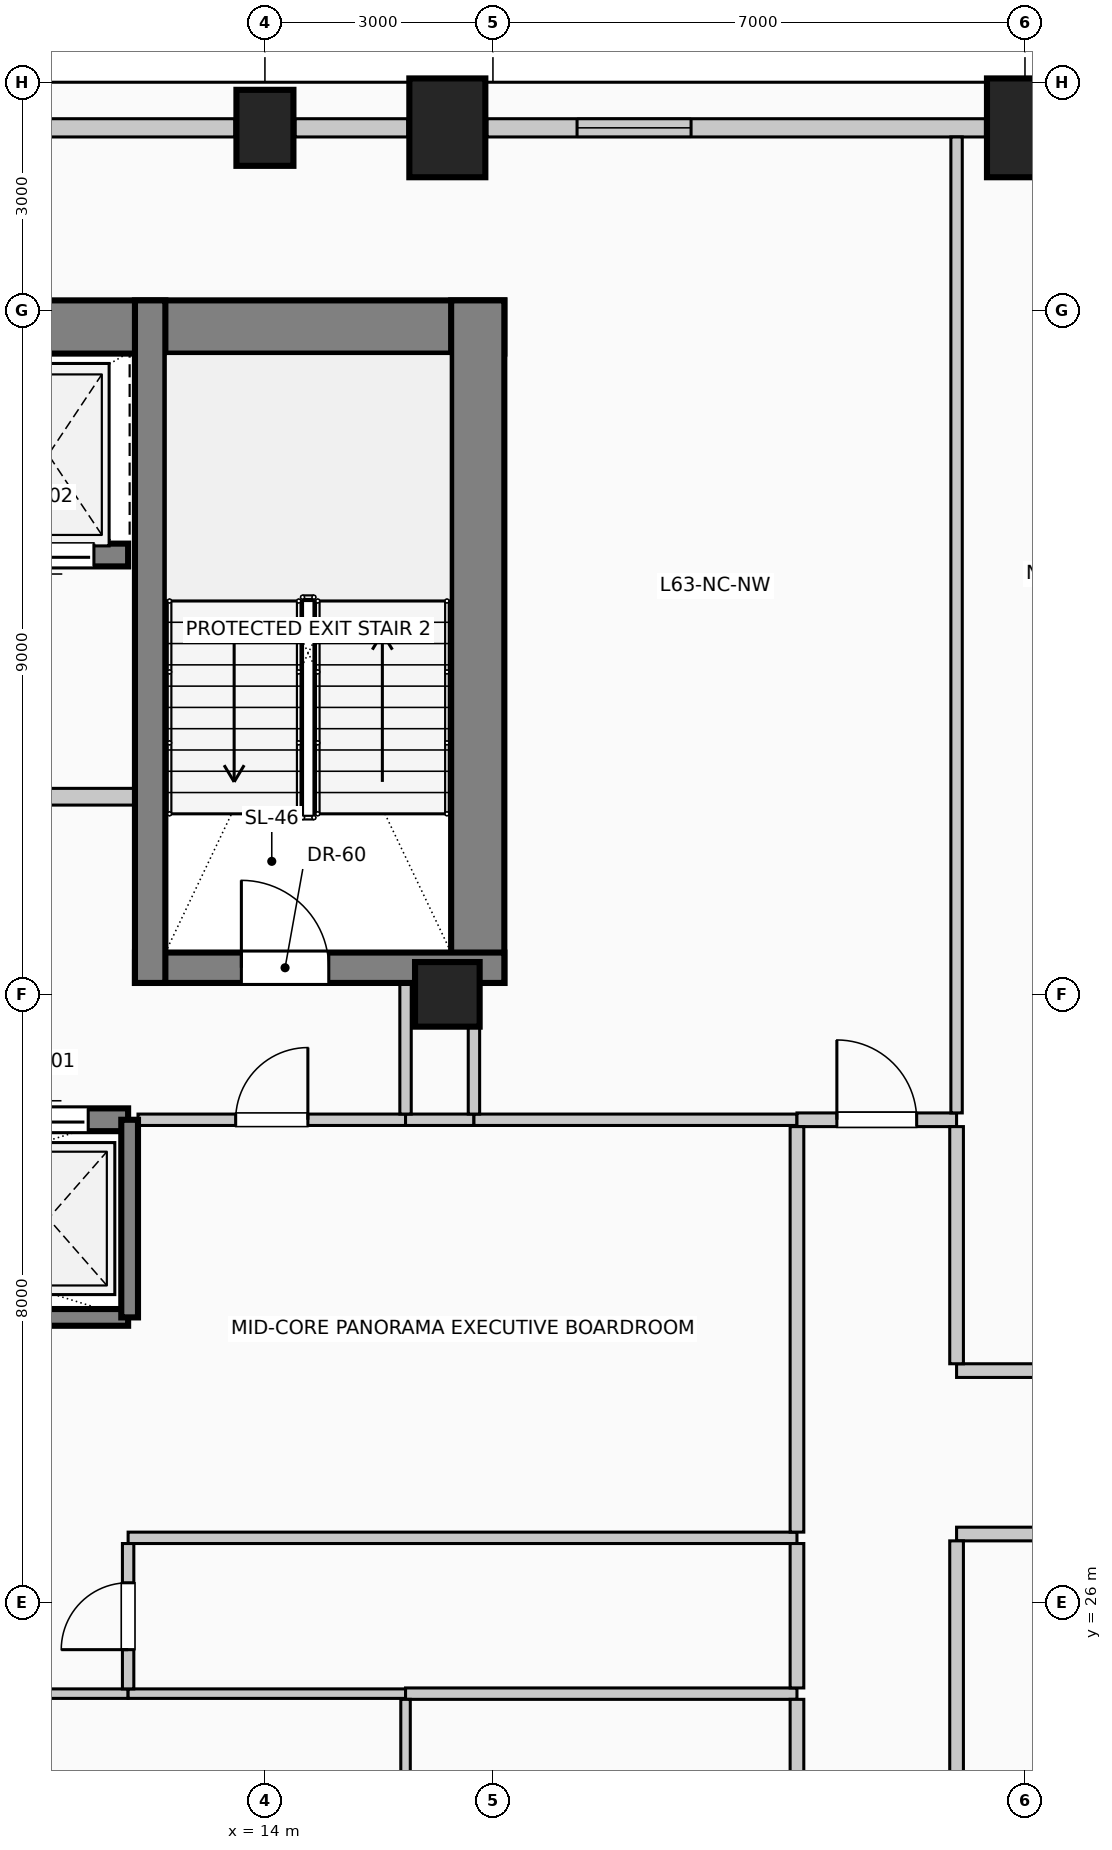
"""IFC4 building model, lengths in metres.
Left out: names, types, materials, properties, quantities, classifications, styles, units other than length and angle.
Written with IfcOpenShell. Run it as: python <this file> out.ifc"""

import sys

from ifc_helpers import new_model, si_unit, direction, frame, frame_2d, origin, origin_2d, place, context, subcontext, project, spatial, rectangle, circle, extrude, element, fill, save


model = new_model("IFC4")
c1 = context("Model", 3, precision=1e-05, world=origin(), true_north=direction((0.0, 1.0)))
c2 = subcontext(c1, "Body", "Model", "MODEL_VIEW")
j1 = project(units=[si_unit("LENGTHUNIT", "METRE"), si_unit("PLANEANGLEUNIT", "RADIAN")], contexts=[c1])
p1 = place(None, origin())
s1 = spatial("IfcSite", under=j1, at=p1, CompositionType="ELEMENT")
p2 = place(p1, origin())
s2 = spatial("IfcBuilding", under=s1, at=p2, CompositionType="ELEMENT")
p3 = place(p2, frame((0.0, 0.0, 260.6)))
s3 = spatial("IfcBuildingStorey", under=s2, at=p3, CompositionType="ELEMENT", Elevation=260.6)
p4 = place(p3, frame((2.85, 42.78, 0.0), z_axis=(0.0, 0.0, 1.0), x_axis=(1.0, 0.0, 0.0)))
e1 = element("IfcWall", 1, at=p4, inside=s3, PredefinedType="SHEAR", context=c2, shape_type="SweptSolid", body=[
    extrude(rectangle(XDim=14.3, YDim=0.7, at=frame_2d((7.15, 0.0))), origin(), (0.0, 0.0, 1.0), 4.0),
])
p5 = place(p3, frame((16.8, 34.15, 0.0), z_axis=(0.0, 0.0, 1.0), x_axis=(0.0, 1.0, 0.0)))
e2 = element("IfcWall", 2, at=p5, inside=s3, PredefinedType="SHEAR", context=c2, shape_type="SweptSolid", body=[
    extrude(rectangle(XDim=8.98, YDim=0.7, at=frame_2d((4.49, 0.0))), origin(), (0.0, 0.0, 1.0), 4.0),
])
p6 = place(p3, frame((12.29, 34.35, 0.0), z_axis=(0.0, 0.0, 1.0), x_axis=(1.0, 0.0, 0.0)))
e3 = element("IfcWall", 3, at=p6, inside=s3, PredefinedType="SHEAR", context=c2, shape_type="SweptSolid", body=[
    extrude(rectangle(XDim=4.86, YDim=0.4, at=frame_2d((2.43, 0.0))), origin(), (0.0, 0.0, 1.0), 4.0),
])
p7 = place(p6, frame((1.4, 0.0, 0.0)))
e4 = element("IfcOpeningElement", 4, at=p7, cuts=e3, PredefinedType="OPENING", context=c2, shape_type="SweptSolid", body=[
    extrude(rectangle(XDim=1.15, YDim=2.2, at=frame_2d((0.575, 1.1))), frame((0.0, 0.21, 0.0), z_axis=(0.0, -1.0, 0.0), x_axis=(1.0, 0.0, 0.0)), (0.0, 0.0, 1.0), 0.42),
])
p8 = place(p3, frame((12.49, 34.15, 0.0), z_axis=(0.0, 0.0, 1.0), x_axis=(0.0, 1.0, 0.0)))
e5 = element("IfcWall", 5, at=p8, inside=s3, PredefinedType="SHEAR", context=c2, shape_type="SweptSolid", body=[
    extrude(rectangle(XDim=8.98, YDim=0.4, at=frame_2d((4.49, 0.0))), origin(), (0.0, 0.0, 1.0), 4.0),
])
p9 = place(p3, frame((14.0, 45.4, 0.0), z_axis=(0.0, 0.0, 1.0), x_axis=(1.0, 0.0, 0.0)))
e6 = element("IfcColumn", 6, at=p9, inside=s3, PredefinedType="COLUMN", context=c2, shape_type="SweptSolid", body=[
    extrude(rectangle(XDim=0.75, YDim=1.0, at=origin_2d()), origin(), (0.0, 0.0, 1.0), 4.0),
])
for number, where, z_axis, x_axis in (
    (7, (16.4, 45.4, 0.0), (0.0, 0.0, 1.0), (1.0, 0.0, 0.0)),
    (8, (24.0, 45.4, 0.0), (0.0, 0.0, 1.0), (1.0, 0.0, 0.0)),
):
    element("IfcColumn", number, at=place(p3, frame(where, z_axis=z_axis, x_axis=x_axis)), inside=s3, PredefinedType="COLUMN", context=c2, shape_type="SweptSolid", body=[
        extrude(rectangle(XDim=1.0, YDim=1.3, at=origin_2d()), origin(), (0.0, 0.0, 1.0), 4.0),
    ])
p10 = place(p3, frame((16.4, 34.0, 0.0), z_axis=(0.0, 0.0, 1.0), x_axis=(1.0, 0.0, 0.0)))
e9 = element("IfcColumn", 9, at=p10, inside=s3, PredefinedType="COLUMN", context=c2, shape_type="SweptSolid", body=[
    extrude(circle(Radius=0.425, at=origin_2d()), origin(), (0.0, 0.0, 1.0), 4.0),
])
p11 = place(p3, frame((8.895, 45.4, 0.0), z_axis=(0.0, 0.0, 1.0), x_axis=(1.0, 0.0, 0.0)))
e10 = element("IfcWall", 10, at=p11, inside=s3, PredefinedType="SOLIDWALL", context=c2, shape_type="SweptSolid", body=[
    extrude(rectangle(XDim=4.71, YDim=0.24, at=frame_2d((2.355, 0.0))), origin(), (0.0, 0.0, 1.0), 3.0),
])
p12 = place(p3, frame((14.395, 45.4, 0.0), z_axis=(0.0, 0.0, 1.0), x_axis=(1.0, 0.0, 0.0)))
e11 = element("IfcWall", 11, at=p12, inside=s3, PredefinedType="SOLIDWALL", context=c2, shape_type="SweptSolid", body=[
    extrude(rectangle(XDim=1.485, YDim=0.24, at=frame_2d((0.742, 0.0))), origin(), (0.0, 0.0, 1.0), 3.0),
])
p13 = place(p3, frame((16.92, 45.4, 0.0), z_axis=(0.0, 0.0, 1.0), x_axis=(1.0, 0.0, 0.0)))
e12 = element("IfcWall", 12, at=p13, inside=s3, PredefinedType="SOLIDWALL", context=c2, shape_type="SweptSolid", body=[
    extrude(rectangle(XDim=6.56, YDim=0.24, at=frame_2d((3.28, 0.0))), origin(), (0.0, 0.0, 1.0), 3.0),
])
p14 = place(p13, frame((1.187, 0.0, 0.42)))
e13 = element("IfcOpeningElement", 13, at=p14, cuts=e12, PredefinedType="OPENING", context=c2, shape_type="SweptSolid", body=[
    extrude(rectangle(XDim=1.5, YDim=2.2, at=frame_2d((0.75, 1.1))), frame((0.0, 0.13, 0.0), z_axis=(0.0, -1.0, 0.0), x_axis=(1.0, 0.0, 0.0)), (0.0, 0.0, 1.0), 0.26),
])
p15 = place(p3, frame((10.05, 32.35, 0.0), z_axis=(0.0, 0.0, 1.0), x_axis=(1.0, 0.0, 0.0)))
e14 = element("IfcWall", 14, at=p15, inside=s3, PredefinedType="SOLIDWALL", context=c2, shape_type="SweptSolid", body=[
    extrude(rectangle(XDim=2.15, YDim=0.3, at=frame_2d((1.075, 0.0))), origin(), (0.0, 0.0, 1.0), 4.0),
])
p16 = place(p15, frame((0.525, 0.0, 0.0)))
e15 = element("IfcOpeningElement", 15, at=p16, cuts=e14, PredefinedType="OPENING", context=c2, shape_type="SweptSolid", body=[
    extrude(rectangle(XDim=1.1, YDim=2.2, at=frame_2d((0.55, 1.1))), frame((0.0, 0.16, 0.0), z_axis=(0.0, -1.0, 0.0), x_axis=(1.0, 0.0, 0.0)), (0.0, 0.0, 1.0), 0.32),
])
p17 = place(p3, frame((12.2, 39.78, 0.0), z_axis=(0.0, 0.0, 1.0), x_axis=(-1.0, 0.0, 0.0)))
e16 = element("IfcWall", 16, at=p17, inside=s3, PredefinedType="SOLIDWALL", context=c2, shape_type="SweptSolid", body=[
    extrude(rectangle(XDim=2.2, YDim=0.3, at=frame_2d((1.1, 0.0))), origin(), (0.0, 0.0, 1.0), 4.0),
])
p18 = place(p17, frame((0.45, 0.0, 0.0)))
e17 = element("IfcOpeningElement", 17, at=p18, cuts=e16, PredefinedType="OPENING", context=c2, shape_type="SweptSolid", body=[
    extrude(rectangle(XDim=1.3, YDim=2.25, at=frame_2d((0.65, 1.125))), frame((0.0, 0.16, 0.0), z_axis=(0.0, -1.0, 0.0), x_axis=(1.0, 0.0, 0.0)), (0.0, 0.0, 1.0), 0.32),
])
p19 = place(p3, frame((3.55, 29.75, 0.0), z_axis=(0.0, 0.0, 1.0), x_axis=(1.0, 0.0, 0.0)))
e18 = element("IfcWall", 18, at=p19, inside=s3, PredefinedType="SOLIDWALL", context=c2, shape_type="SweptSolid", body=[
    extrude(rectangle(XDim=8.65, YDim=0.22, at=frame_2d((4.325, 0.0))), origin(), (0.0, 0.0, 1.0), 4.0),
])
p20 = place(p3, frame((12.22, 29.75, 0.0), z_axis=(0.0, 0.0, 1.0), x_axis=(0.0, 1.0, 0.0)))
e19 = element("IfcWall", 19, at=p20, inside=s3, PredefinedType="SOLIDWALL", context=c2, shape_type="SweptSolid", body=[
    extrude(rectangle(XDim=2.6, YDim=0.22, at=frame_2d((1.3, 0.0))), origin(), (0.0, 0.0, 1.0), 4.0),
])
p21 = place(p3, frame((7.51, 36.6, 0.0), z_axis=(0.0, 0.0, 1.0), x_axis=(1.0, 0.0, 0.0)))
e20 = element("IfcWall", 20, at=p21, inside=s3, PredefinedType="PARTITIONING", context=c2, shape_type="SweptSolid", body=[
    extrude(rectangle(XDim=4.98, YDim=0.22, at=frame_2d((2.49, 0.0))), origin(), (0.0, 0.0, 1.0), 3.75),
])
p22 = place(p21, frame((1.94, 0.0, 0.0)))
e21 = element("IfcOpeningElement", 21, at=p22, cuts=e20, PredefinedType="OPENING", context=c2, shape_type="SweptSolid", body=[
    extrude(rectangle(XDim=1.1, YDim=2.2, at=frame_2d((0.55, 1.1))), frame((0.0, 0.12, 0.0), z_axis=(0.0, -1.0, 0.0), x_axis=(1.0, 0.0, 0.0)), (0.0, 0.0, 1.0), 0.24),
])
p23 = place(p3, frame((9.8, 24.8, 0.0), z_axis=(0.0, 0.0, 1.0), x_axis=(1.0, 0.0, 0.0)))
e22 = element("IfcWall", 22, at=p23, inside=s3, PredefinedType="PARTITIONING", context=c2, shape_type="SweptSolid", body=[
    extrude(rectangle(XDim=2.4, YDim=0.125, at=frame_2d((1.2, 0.0))), origin(), (0.0, 0.0, 1.0), 3.75),
])
p24 = place(p3, frame((12.2, 24.8, 0.0), z_axis=(0.0, 0.0, 1.0), x_axis=(1.0, 0.0, 0.0)))
e23 = element("IfcWall", 23, at=p24, inside=s3, PredefinedType="PARTITIONING", context=c2, shape_type="SweptSolid", body=[
    extrude(rectangle(XDim=3.65, YDim=0.125, at=frame_2d((1.825, 0.0))), origin(), (0.0, 0.0, 1.0), 3.75),
])
p25 = place(p3, frame((15.85, 24.8, 0.0), z_axis=(0.0, 0.0, 1.0), x_axis=(1.0, 0.0, 0.0)))
e24 = element("IfcWall", 24, at=p25, inside=s3, PredefinedType="PARTITIONING", context=c2, shape_type="SweptSolid", body=[
    extrude(rectangle(XDim=5.15, YDim=0.15, at=frame_2d((2.575, 0.0))), origin(), (0.0, 0.0, 1.0), 3.75),
])
p26 = place(p3, frame((12.2, 26.85, 0.0), z_axis=(0.0, 0.0, 1.0), x_axis=(1.0, 0.0, 0.0)))
e25 = element("IfcWall", 25, at=p26, inside=s3, PredefinedType="PARTITIONING", context=c2, shape_type="SweptSolid", body=[
    extrude(rectangle(XDim=8.8, YDim=0.15, at=frame_2d((4.4, 0.0))), origin(), (0.0, 0.0, 1.0), 3.75),
])
p27 = place(p3, frame((23.1, 26.9, 0.0), z_axis=(0.0, 0.0, 1.0), x_axis=(1.0, 0.0, 0.0)))
e26 = element("IfcWall", 26, at=p27, inside=s3, PredefinedType="PARTITIONING", context=c2, shape_type="SweptSolid", body=[
    extrude(rectangle(XDim=4.12, YDim=0.18, at=frame_2d((2.06, 0.0))), origin(), (0.0, 0.0, 1.0), 3.75),
])
p28 = place(p27, frame((1.535, 0.0, 0.0)))
e27 = element("IfcOpeningElement", 27, at=p28, cuts=e26, PredefinedType="OPENING", context=c2, shape_type="SweptSolid", body=[
    extrude(rectangle(XDim=1.05, YDim=2.15, at=frame_2d((0.525, 1.075))), frame((0.0, 0.1, 0.0), z_axis=(0.0, -1.0, 0.0), x_axis=(1.0, 0.0, 0.0)), (0.0, 0.0, 1.0), 0.2),
])
p29 = place(p3, frame((23.1, 29.05, 0.0), z_axis=(0.0, 0.0, 1.0), x_axis=(1.0, 0.0, 0.0)))
e28 = element("IfcWall", 28, at=p29, inside=s3, PredefinedType="PARTITIONING", context=c2, shape_type="SweptSolid", body=[
    extrude(rectangle(XDim=7.13, YDim=0.18, at=frame_2d((3.565, 0.0))), origin(), (0.0, 0.0, 1.0), 3.75),
])
p30 = place(p29, frame((3.09, 0.0, 0.0)))
e29 = element("IfcOpeningElement", 29, at=p30, cuts=e28, PredefinedType="OPENING", context=c2, shape_type="SweptSolid", body=[
    extrude(rectangle(XDim=0.95, YDim=2.15, at=frame_2d((0.475, 1.075))), frame((0.0, 0.1, 0.0), z_axis=(0.0, -1.0, 0.0), x_axis=(1.0, 0.0, 0.0)), (0.0, 0.0, 1.0), 0.2),
])
p31 = place(p3, frame((12.33, 32.35, 0.0), z_axis=(0.0, 0.0, 1.0), x_axis=(1.0, 0.0, 0.0)))
e30 = element("IfcWall", 30, at=p31, inside=s3, PredefinedType="PARTITIONING", context=c2, shape_type="SweptSolid", body=[
    extrude(rectangle(XDim=3.52, YDim=0.15, at=frame_2d((1.76, 0.0))), origin(), (0.0, 0.0, 1.0), 3.75),
])
p32 = place(p31, frame((1.285, 0.0, 0.0)))
e31 = element("IfcOpeningElement", 31, at=p32, cuts=e30, PredefinedType="OPENING", context=c2, shape_type="SweptSolid", body=[
    extrude(rectangle(XDim=0.95, YDim=2.15, at=frame_2d((0.475, 1.075))), frame((0.0, 0.085, 0.0), z_axis=(0.0, -1.0, 0.0), x_axis=(1.0, 0.0, 0.0)), (0.0, 0.0, 1.0), 0.17),
])
p33 = place(p3, frame((15.85, 32.35, 0.0), z_axis=(0.0, 0.0, 1.0), x_axis=(1.0, 0.0, 0.0)))
e32 = element("IfcWall", 32, at=p33, inside=s3, PredefinedType="PARTITIONING", context=c2, shape_type="SweptSolid", body=[
    extrude(rectangle(XDim=0.9, YDim=0.15, at=frame_2d((0.45, 0.0))), origin(), (0.0, 0.0, 1.0), 3.75),
])
p34 = place(p3, frame((16.75, 32.35, 0.0), z_axis=(0.0, 0.0, 1.0), x_axis=(1.0, 0.0, 0.0)))
e33 = element("IfcWall", 33, at=p34, inside=s3, PredefinedType="PARTITIONING", context=c2, shape_type="SweptSolid", body=[
    extrude(rectangle(XDim=4.25, YDim=0.15, at=frame_2d((2.125, 0.0))), origin(), (0.0, 0.0, 1.0), 3.75),
])
p35 = place(p3, frame((21.0, 32.35, 0.0), z_axis=(0.0, 0.0, 1.0), x_axis=(1.0, 0.0, 0.0)))
e34 = element("IfcWall", 34, at=p35, inside=s3, PredefinedType="PARTITIONING", context=c2, shape_type="SweptSolid", body=[
    extrude(rectangle(XDim=2.1, YDim=0.18, at=frame_2d((1.05, 0.0))), origin(), (0.0, 0.0, 1.0), 3.75),
])
p36 = place(p35, frame((0.525, 0.0, 0.0)))
e35 = element("IfcOpeningElement", 35, at=p36, cuts=e34, PredefinedType="OPENING", context=c2, shape_type="SweptSolid", body=[
    extrude(rectangle(XDim=1.05, YDim=2.15, at=frame_2d((0.525, 1.075))), frame((0.0, 0.1, 0.0), z_axis=(0.0, -1.0, 0.0), x_axis=(1.0, 0.0, 0.0)), (0.0, 0.0, 1.0), 0.2),
])
p37 = place(p3, frame((12.2, 24.863, 0.0), z_axis=(0.0, 0.0, 1.0), x_axis=(0.0, 1.0, 0.0)))
e36 = element("IfcWall", 36, at=p37, inside=s3, PredefinedType="PARTITIONING", context=c2, shape_type="SweptSolid", body=[
    extrude(rectangle(XDim=1.912, YDim=0.15, at=frame_2d((0.956, 0.0))), origin(), (0.0, 0.0, 1.0), 3.75),
])
p38 = place(p37, frame((0.516, 0.0, 0.0)))
e37 = element("IfcOpeningElement", 37, at=p38, cuts=e36, PredefinedType="OPENING", context=c2, shape_type="SweptSolid", body=[
    extrude(rectangle(XDim=0.88, YDim=2.1, at=frame_2d((0.44, 1.05))), frame((0.0, 0.085, 0.0), z_axis=(0.0, -1.0, 0.0), x_axis=(1.0, 0.0, 0.0)), (0.0, 0.0, 1.0), 0.17),
])
p39 = place(p3, frame((15.85, 17.39, 0.0), z_axis=(0.0, 0.0, 1.0), x_axis=(0.0, 1.0, 0.0)))
e38 = element("IfcWall", 38, at=p39, inside=s3, PredefinedType="PARTITIONING", context=c2, shape_type="SweptSolid", body=[
    extrude(rectangle(XDim=7.335, YDim=0.125, at=frame_2d((3.667, 0.0))), origin(), (0.0, 0.0, 1.0), 3.75),
])
p40 = place(p3, frame((15.85, 32.425, 0.0), z_axis=(0.0, 0.0, 1.0), x_axis=(0.0, 1.0, 0.0)))
e39 = element("IfcWall", 39, at=p40, inside=s3, PredefinedType="PARTITIONING", context=c2, shape_type="SweptSolid", body=[
    extrude(rectangle(XDim=1.725, YDim=0.15, at=frame_2d((0.862, 0.0))), origin(), (0.0, 0.0, 1.0), 3.75),
])
p41 = place(p3, frame((16.75, 32.425, 0.0), z_axis=(0.0, 0.0, 1.0), x_axis=(0.0, 1.0, 0.0)))
e40 = element("IfcWall", 40, at=p41, inside=s3, PredefinedType="PARTITIONING", context=c2, shape_type="SweptSolid", body=[
    extrude(rectangle(XDim=1.15, YDim=0.15, at=frame_2d((0.575, 0.0))), origin(), (0.0, 0.0, 1.0), 3.75),
])
p42 = place(p3, frame((21.0, 17.39, 0.0), z_axis=(0.0, 0.0, 1.0), x_axis=(0.0, 1.0, 0.0)))
e41 = element("IfcWall", 41, at=p42, inside=s3, PredefinedType="PARTITIONING", context=c2, shape_type="SweptSolid", body=[
    extrude(rectangle(XDim=7.335, YDim=0.18, at=frame_2d((3.667, 0.0))), origin(), (0.0, 0.0, 1.0), 3.75),
])
p43 = place(p3, frame((21.0, 24.875, 0.0), z_axis=(0.0, 0.0, 1.0), x_axis=(0.0, 1.0, 0.0)))
e42 = element("IfcWall", 42, at=p43, inside=s3, PredefinedType="PARTITIONING", context=c2, shape_type="SweptSolid", body=[
    extrude(rectangle(XDim=1.9, YDim=0.18, at=frame_2d((0.95, 0.0))), origin(), (0.0, 0.0, 1.0), 3.75),
])
p44 = place(p3, frame((21.0, 26.925, 0.0), z_axis=(0.0, 0.0, 1.0), x_axis=(0.0, 1.0, 0.0)))
e43 = element("IfcWall", 43, at=p44, inside=s3, PredefinedType="PARTITIONING", context=c2, shape_type="SweptSolid", body=[
    extrude(rectangle(XDim=5.335, YDim=0.18, at=frame_2d((2.667, 0.0))), origin(), (0.0, 0.0, 1.0), 3.75),
])
p45 = place(p3, frame((23.1, 17.3, 0.0), z_axis=(0.0, 0.0, 1.0), x_axis=(0.0, 1.0, 0.0)))
e44 = element("IfcWall", 44, at=p45, inside=s3, PredefinedType="PARTITIONING", context=c2, shape_type="SweptSolid", body=[
    extrude(rectangle(XDim=9.51, YDim=0.18, at=frame_2d((4.755, 0.0))), origin(), (0.0, 0.0, 1.0), 3.75),
])
p46 = place(p3, frame((23.1, 29.14, 0.0), z_axis=(0.0, 0.0, 1.0), x_axis=(0.0, 1.0, 0.0)))
e45 = element("IfcWall", 45, at=p46, inside=s3, PredefinedType="PARTITIONING", context=c2, shape_type="SweptSolid", body=[
    extrude(rectangle(XDim=3.12, YDim=0.18, at=frame_2d((1.56, 0.0))), origin(), (0.0, 0.0, 1.0), 3.75),
])
p47 = place(p3, frame((23.1, 32.44, 0.0), z_axis=(0.0, 0.0, 1.0), x_axis=(0.0, 1.0, 0.0)))
e46 = element("IfcWall", 46, at=p47, inside=s3, PredefinedType="PARTITIONING", context=c2, shape_type="SweptSolid", body=[
    extrude(rectangle(XDim=12.84, YDim=0.15, at=frame_2d((6.42, 0.0))), origin(), (0.0, 0.0, 1.0), 3.75),
])
p48 = place(p14, origin())
e47 = element("IfcWindow", 47, at=p48, inside=s3, PartitioningType="SINGLE_PANEL", PredefinedType="WINDOW", context=c2, shape_type="SweptSolid", body=[
    extrude(rectangle(XDim=1.5, YDim=2.2, at=frame_2d((0.75, 1.1))), frame((0.0, 0.03, 0.0), z_axis=(0.0, -1.0, 0.0), x_axis=(1.0, 0.0, 0.0)), (0.0, 0.0, 1.0), 0.06),
])
fill(e13, e47)
p49 = place(p16, origin())
e48 = element("IfcDoor", 48, at=p49, inside=s3, OperationType="SLIDING_TO_RIGHT", PredefinedType="DOOR", context=c2, shape_type="SweptSolid", body=[
    extrude(rectangle(XDim=1.1, YDim=2.2, at=frame_2d((0.55, 1.1))), frame((0.0, 0.025, 0.0), z_axis=(0.0, -1.0, 0.0), x_axis=(1.0, 0.0, 0.0)), (0.0, 0.0, 1.0), 0.05),
])
fill(e15, e48)
p50 = place(p18, origin())
e49 = element("IfcDoor", 49, at=p50, inside=s3, OperationType="SLIDING_TO_RIGHT", PredefinedType="DOOR", context=c2, shape_type="SweptSolid", body=[
    extrude(rectangle(XDim=1.3, YDim=2.25, at=frame_2d((0.65, 1.125))), frame((0.0, 0.025, 0.0), z_axis=(0.0, -1.0, 0.0), x_axis=(1.0, 0.0, 0.0)), (0.0, 0.0, 1.0), 0.05),
])
fill(e17, e49)
p51 = place(p7, origin())
e50 = element("IfcDoor", 50, at=p51, inside=s3, OperationType="SINGLE_SWING_LEFT", PredefinedType="DOOR", context=c2, shape_type="SweptSolid", body=[
    extrude(rectangle(XDim=1.15, YDim=2.2, at=frame_2d((0.575, 1.1))), frame((0.0, 0.025, 0.0), z_axis=(0.0, -1.0, 0.0), x_axis=(1.0, 0.0, 0.0)), (0.0, 0.0, 1.0), 0.05),
])
fill(e4, e50)
p52 = place(p32, origin())
e51 = element("IfcDoor", 51, at=p52, inside=s3, OperationType="SINGLE_SWING_RIGHT", PredefinedType="DOOR", context=c2, shape_type="SweptSolid", body=[
    extrude(rectangle(XDim=0.95, YDim=2.15, at=frame_2d((0.475, 1.075))), frame((0.0, 0.025, 0.0), z_axis=(0.0, -1.0, 0.0), x_axis=(1.0, 0.0, 0.0)), (0.0, 0.0, 1.0), 0.05),
])
fill(e31, e51)
p53 = place(p36, origin())
e52 = element("IfcDoor", 52, at=p53, inside=s3, OperationType="SINGLE_SWING_LEFT", PredefinedType="DOOR", context=c2, shape_type="SweptSolid", body=[
    extrude(rectangle(XDim=1.05, YDim=2.15, at=frame_2d((0.525, 1.075))), frame((0.0, 0.025, 0.0), z_axis=(0.0, -1.0, 0.0), x_axis=(1.0, 0.0, 0.0)), (0.0, 0.0, 1.0), 0.05),
])
fill(e35, e52)
p54 = place(p38, origin())
e53 = element("IfcDoor", 53, at=p54, inside=s3, OperationType="SINGLE_SWING_LEFT", PredefinedType="DOOR", context=c2, shape_type="SweptSolid", body=[
    extrude(rectangle(XDim=0.88, YDim=2.1, at=frame_2d((0.44, 1.05))), frame((0.0, 0.025, 0.0), z_axis=(0.0, -1.0, 0.0), x_axis=(1.0, 0.0, 0.0)), (0.0, 0.0, 1.0), 0.05),
])
fill(e37, e53)
save(model, sys.argv[1])
